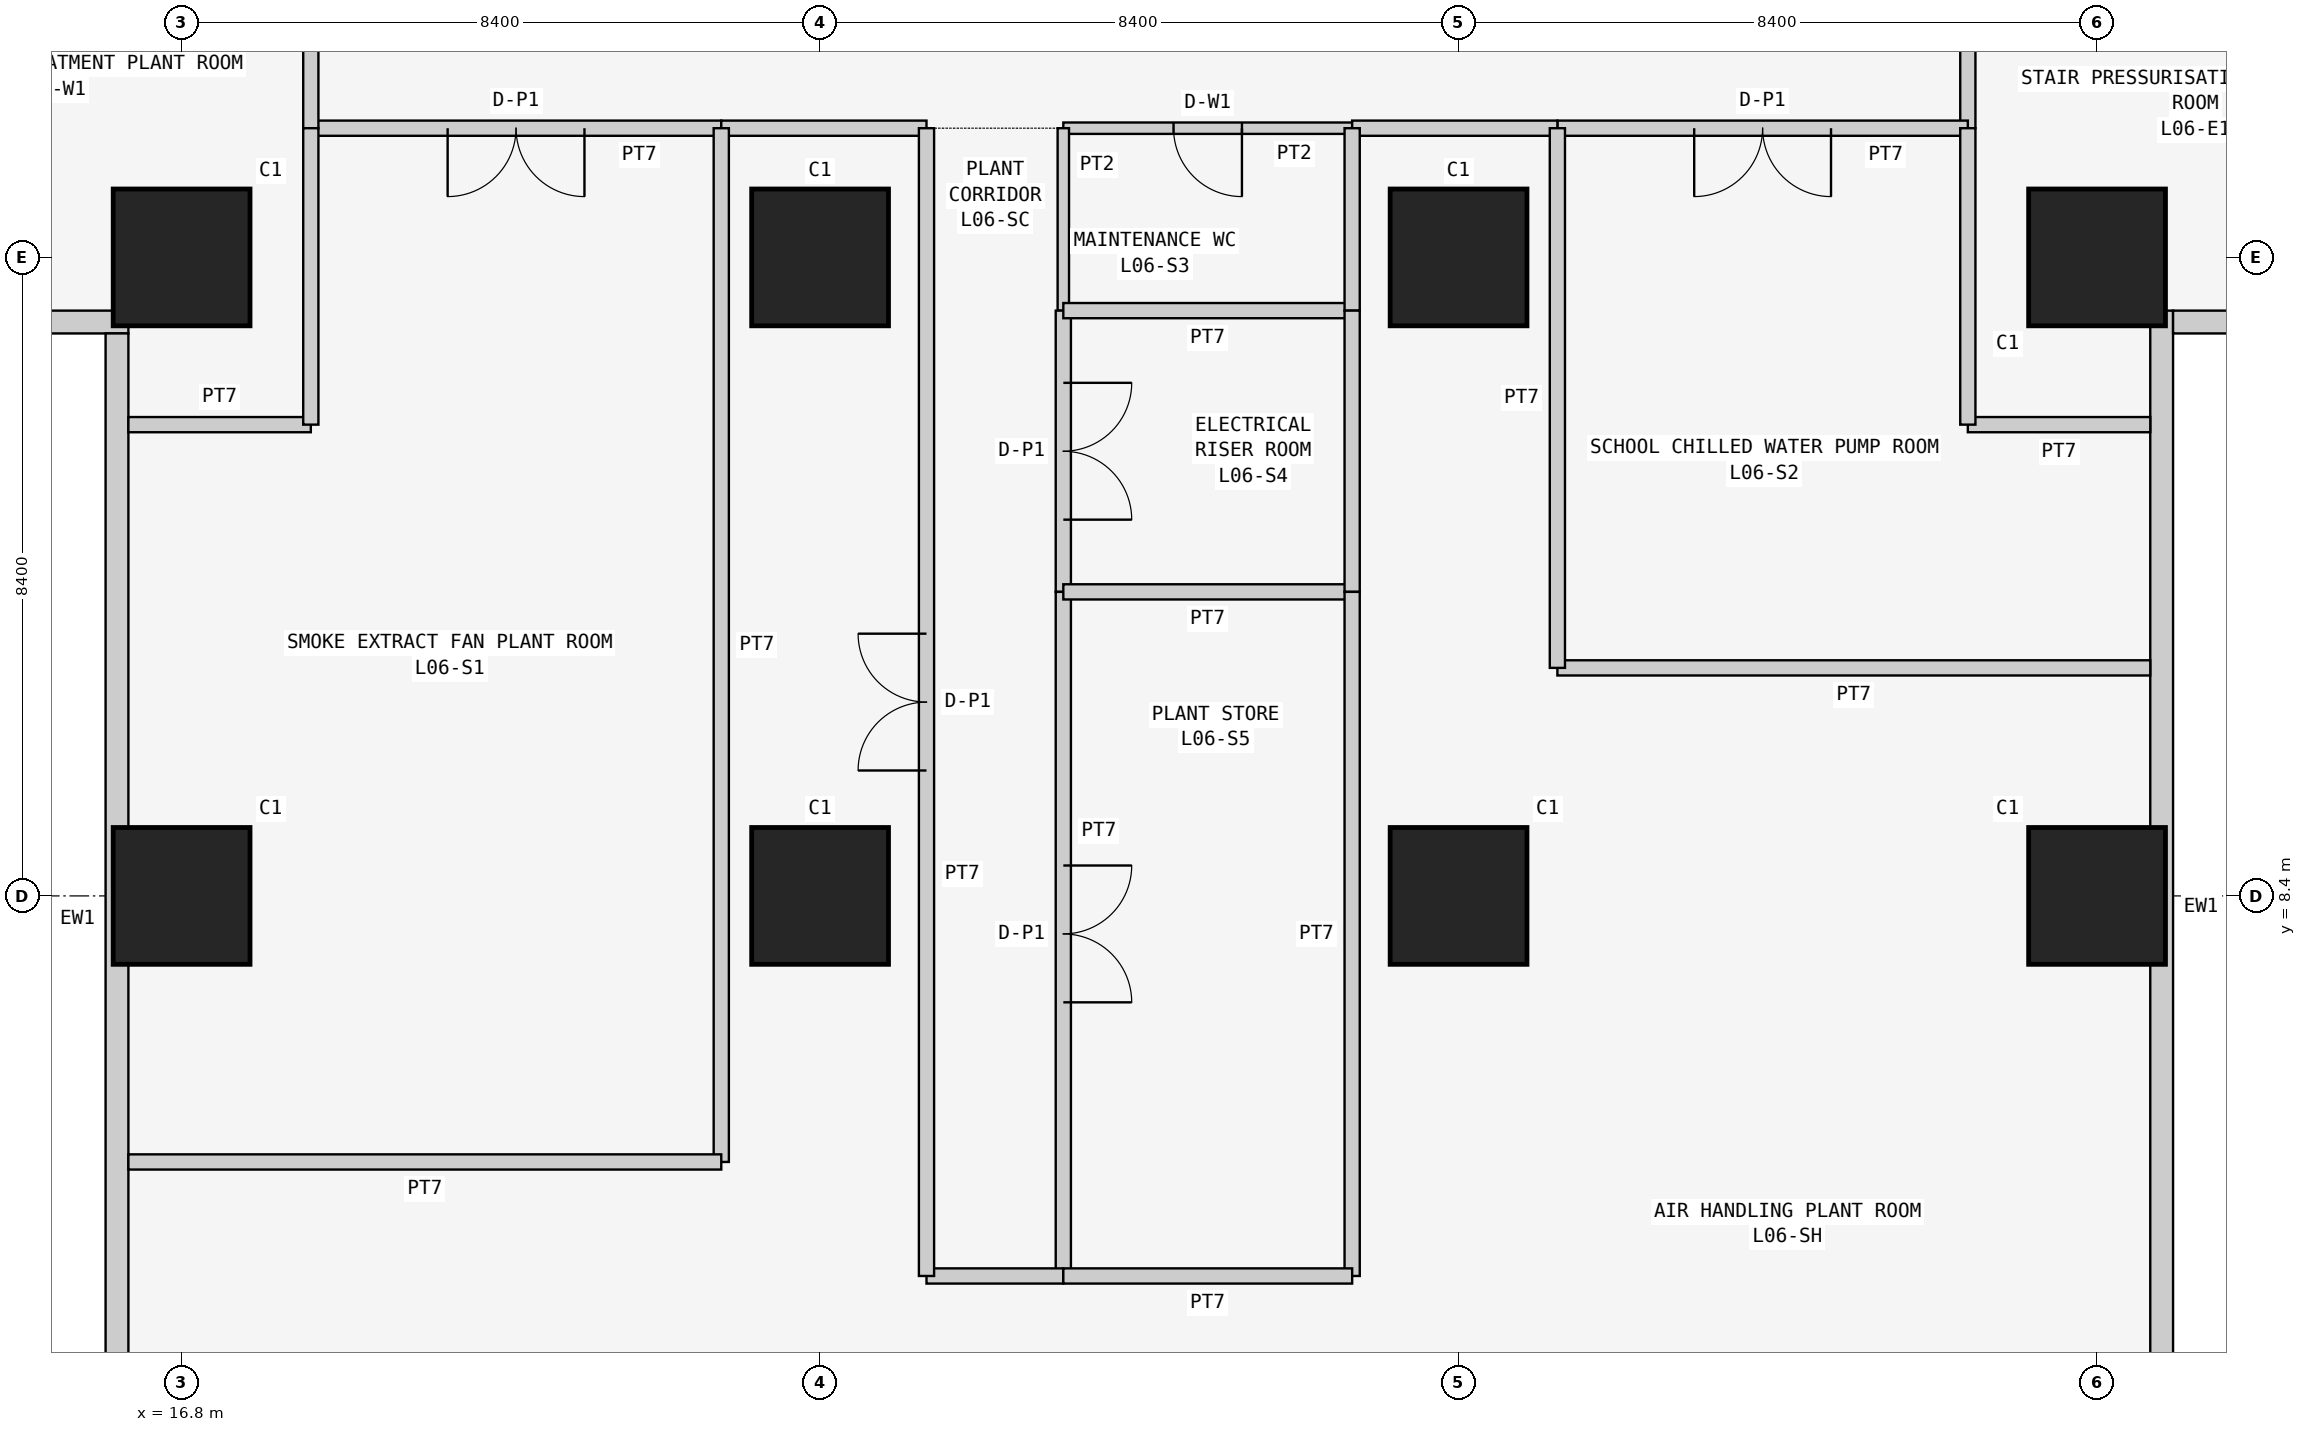
"""IFC4 building model, lengths in metres.
Left out: names, types, materials, properties, quantities, classifications, styles, units other than length and angle.
Written with IfcOpenShell. Run it as: python <this file> out.ifc"""

import sys

from ifc_helpers import new_model, si_unit, direction, frame, frame_2d, origin, origin_2d, place, context, subcontext, project, spatial, rectangle, extrude, element, fill, save


model = new_model("IFC4")
c1 = context("Model", 3, precision=1e-05, world=origin(), true_north=direction((0.0, 1.0)))
c2 = subcontext(c1, "Body", "Model", "MODEL_VIEW")
j1 = project(units=[si_unit("LENGTHUNIT", "METRE"), si_unit("PLANEANGLEUNIT", "RADIAN")], contexts=[c1])
p1 = place(None, origin())
s1 = spatial("IfcSite", under=j1, at=p1, CompositionType="ELEMENT")
p2 = place(p1, origin())
s2 = spatial("IfcBuilding", under=s1, at=p2, CompositionType="ELEMENT")
p3 = place(p2, frame((0.0, 0.0, 28.5)))
s3 = spatial("IfcBuildingStorey", under=s2, at=p3, CompositionType="ELEMENT", Elevation=28.5)
for number, where, z_axis, x_axis in (
    (1, (16.8, 8.4, 0.0), (0.0, 0.0, 1.0), (1.0, 0.0, 0.0)),
    (2, (16.8, 16.8, 0.0), (0.0, 0.0, 1.0), (1.0, 0.0, 0.0)),
    (3, (25.2, 8.4, 0.0), (0.0, 0.0, 1.0), (1.0, 0.0, 0.0)),
    (4, (25.2, 16.8, 0.0), (0.0, 0.0, 1.0), (1.0, 0.0, 0.0)),
    (5, (33.6, 8.4, 0.0), (0.0, 0.0, 1.0), (1.0, 0.0, 0.0)),
    (6, (33.6, 16.8, 0.0), (0.0, 0.0, 1.0), (1.0, 0.0, 0.0)),
    (7, (42.0, 8.4, 0.0), (0.0, 0.0, 1.0), (1.0, 0.0, 0.0)),
    (8, (42.0, 16.8, 0.0), (0.0, 0.0, 1.0), (1.0, 0.0, 0.0)),
):
    element("IfcColumn", number, at=place(p3, frame(where, z_axis=z_axis, x_axis=x_axis)), inside=s3, PredefinedType="COLUMN", context=c2, shape_type="SweptSolid", body=[
        extrude(rectangle(XDim=1.8, YDim=1.8, at=origin_2d()), origin(), (0.0, 0.0, 1.0), 6.0),
    ])
p4 = place(p3, frame((0.4, 15.95, 0.0), z_axis=(0.0, 0.0, 1.0), x_axis=(1.0, 0.0, 0.0)))
e9 = element("IfcWall", 9, at=p4, inside=s3, PredefinedType="SOLIDWALL", context=c2, shape_type="SweptSolid", body=[
    extrude(rectangle(XDim=15.7, YDim=0.3, at=frame_2d((7.85, 0.0))), origin(), (0.0, 0.0, 1.0), 5.85),
])
p5 = place(p3, frame((15.95, 15.8, 0.0), z_axis=(0.0, 0.0, 1.0), x_axis=(0.0, -1.0, 0.0)))
e10 = element("IfcWall", 10, at=p5, inside=s3, PredefinedType="SOLIDWALL", context=c2, shape_type="SweptSolid", body=[
    extrude(rectangle(XDim=15.4, YDim=0.3, at=frame_2d((7.7, 0.0))), origin(), (0.0, 0.0, 1.0), 5.85),
])
p6 = place(p3, frame((42.85, 0.4, 0.0), z_axis=(0.0, 0.0, 1.0), x_axis=(0.0, 1.0, 0.0)))
e11 = element("IfcWall", 11, at=p6, inside=s3, PredefinedType="SOLIDWALL", context=c2, shape_type="SweptSolid", body=[
    extrude(rectangle(XDim=15.7, YDim=0.3, at=frame_2d((7.85, 0.0))), origin(), (0.0, 0.0, 1.0), 5.85),
])
p7 = place(p3, frame((43.0, 15.95, 0.0), z_axis=(0.0, 0.0, 1.0), x_axis=(1.0, 0.0, 0.0)))
e12 = element("IfcWall", 12, at=p7, inside=s3, PredefinedType="SOLIDWALL", context=c2, shape_type="SweptSolid", body=[
    extrude(rectangle(XDim=15.4, YDim=0.3, at=frame_2d((7.7, 0.0))), origin(), (0.0, 0.0, 1.0), 5.85),
])
p8 = place(p3, frame((40.3, 23.9, 0.0), z_axis=(0.0, 0.0, 1.0), x_axis=(0.0, -1.0, 0.0)))
e13 = element("IfcWall", 13, at=p8, inside=s3, PredefinedType="PARTITIONING", context=c2, shape_type="SweptSolid", body=[
    extrude(rectangle(XDim=5.4, YDim=0.2, at=frame_2d((2.7, 0.0))), origin(), (0.0, 0.0, 1.0), 5.85),
])
p9 = place(p8, frame((1.8, 0.0, 0.0)))
e14 = element("IfcOpeningElement", 14, at=p9, cuts=e13, PredefinedType="OPENING", context=c2, shape_type="SweptSolid", body=[
    extrude(rectangle(XDim=1.8, YDim=2.4, at=frame_2d((0.9, 1.2))), frame((0.0, 0.11, 0.0), z_axis=(0.0, -1.0, 0.0), x_axis=(1.0, 0.0, 0.0)), (0.0, 0.0, 1.0), 0.22),
])
p10 = place(p3, frame((23.9, 18.5, 0.0), z_axis=(0.0, 0.0, 1.0), x_axis=(-1.0, 0.0, 0.0)))
e15 = element("IfcWall", 15, at=p10, inside=s3, PredefinedType="PARTITIONING", context=c2, shape_type="SweptSolid", body=[
    extrude(rectangle(XDim=5.4, YDim=0.2, at=frame_2d((2.7, 0.0))), origin(), (0.0, 0.0, 1.0), 5.85),
])
p11 = place(p10, frame((1.8, 0.0, 0.0)))
e16 = element("IfcOpeningElement", 16, at=p11, cuts=e15, PredefinedType="OPENING", context=c2, shape_type="SweptSolid", body=[
    extrude(rectangle(XDim=1.8, YDim=2.4, at=frame_2d((0.9, 1.2))), frame((0.0, 0.11, 0.0), z_axis=(0.0, -1.0, 0.0), x_axis=(1.0, 0.0, 0.0)), (0.0, 0.0, 1.0), 0.22),
])
p12 = place(p3, frame((40.3, 18.5, 0.0), z_axis=(0.0, 0.0, 1.0), x_axis=(-1.0, 0.0, 0.0)))
e17 = element("IfcWall", 17, at=p12, inside=s3, PredefinedType="PARTITIONING", context=c2, shape_type="SweptSolid", body=[
    extrude(rectangle(XDim=5.4, YDim=0.2, at=frame_2d((2.7, 0.0))), origin(), (0.0, 0.0, 1.0), 5.85),
])
p13 = place(p12, frame((1.8, 0.0, 0.0)))
e18 = element("IfcOpeningElement", 18, at=p13, cuts=e17, PredefinedType="OPENING", context=c2, shape_type="SweptSolid", body=[
    extrude(rectangle(XDim=1.8, YDim=2.4, at=frame_2d((0.9, 1.2))), frame((0.0, 0.11, 0.0), z_axis=(0.0, -1.0, 0.0), x_axis=(1.0, 0.0, 0.0)), (0.0, 0.0, 1.0), 0.22),
])
p14 = place(p3, frame((32.2, 18.5, 0.0), z_axis=(0.0, 0.0, 1.0), x_axis=(-1.0, 0.0, 0.0)))
e19 = element("IfcWall", 19, at=p14, inside=s3, PredefinedType="PARTITIONING", context=c2, shape_type="SweptSolid", body=[
    extrude(rectangle(XDim=3.8, YDim=0.15, at=frame_2d((1.9, 0.0))), origin(), (0.0, 0.0, 1.0), 5.85),
])
p15 = place(p14, frame((1.45, 0.0, 0.0)))
e20 = element("IfcOpeningElement", 20, at=p15, cuts=e19, PredefinedType="OPENING", context=c2, shape_type="SweptSolid", body=[
    extrude(rectangle(XDim=0.9, YDim=2.1, at=frame_2d((0.45, 1.05))), frame((0.0, 0.085, 0.0), z_axis=(0.0, -1.0, 0.0), x_axis=(1.0, 0.0, 0.0)), (0.0, 0.0, 1.0), 0.17),
])
p16 = place(p3, frame((26.6, 18.5, 0.0), z_axis=(0.0, 0.0, 1.0), x_axis=(-1.0, 0.0, 0.0)))
e21 = element("IfcWall", 21, at=p16, inside=s3, PredefinedType="PARTITIONING", context=c2, shape_type="SweptSolid", body=[
    extrude(rectangle(XDim=2.7, YDim=0.2, at=frame_2d((1.35, 0.0))), origin(), (0.0, 0.0, 1.0), 5.85),
])
p17 = place(p3, frame((34.9, 18.5, 0.0), z_axis=(0.0, 0.0, 1.0), x_axis=(-1.0, 0.0, 0.0)))
e22 = element("IfcWall", 22, at=p17, inside=s3, PredefinedType="PARTITIONING", context=c2, shape_type="SweptSolid", body=[
    extrude(rectangle(XDim=2.7, YDim=0.2, at=frame_2d((1.35, 0.0))), origin(), (0.0, 0.0, 1.0), 5.85),
])
p18 = place(p3, frame((18.5, 18.5, 0.0), z_axis=(0.0, 0.0, 1.0), x_axis=(0.0, 1.0, 0.0)))
e23 = element("IfcWall", 23, at=p18, inside=s3, PredefinedType="PARTITIONING", context=c2, shape_type="SweptSolid", body=[
    extrude(rectangle(XDim=5.4, YDim=0.2, at=frame_2d((2.7, 0.0))), origin(), (0.0, 0.0, 1.0), 5.85),
])
p19 = place(p18, frame((1.8, 0.0, 0.0)))
e24 = element("IfcOpeningElement", 24, at=p19, cuts=e23, PredefinedType="OPENING", context=c2, shape_type="SweptSolid", body=[
    extrude(rectangle(XDim=1.8, YDim=2.4, at=frame_2d((0.9, 1.2))), frame((0.0, 0.11, 0.0), z_axis=(0.0, -1.0, 0.0), x_axis=(1.0, 0.0, 0.0)), (0.0, 0.0, 1.0), 0.22),
])
p20 = place(p3, frame((42.7, 14.6, 0.0), z_axis=(0.0, 0.0, 1.0), x_axis=(-1.0, 0.0, 0.0)))
e25 = element("IfcWall", 25, at=p20, inside=s3, PredefinedType="PARTITIONING", context=c2, shape_type="SweptSolid", body=[
    extrude(rectangle(XDim=2.4, YDim=0.2, at=frame_2d((1.2, 0.0))), origin(), (0.0, 0.0, 1.0), 5.85),
])
p21 = place(p3, frame((40.3, 14.6, 0.0), z_axis=(0.0, 0.0, 1.0), x_axis=(0.0, 1.0, 0.0)))
e26 = element("IfcWall", 26, at=p21, inside=s3, PredefinedType="PARTITIONING", context=c2, shape_type="SweptSolid", body=[
    extrude(rectangle(XDim=3.9, YDim=0.2, at=frame_2d((1.95, 0.0))), origin(), (0.0, 0.0, 1.0), 5.85),
])
p22 = place(p3, frame((23.9, 18.5, 0.0), z_axis=(0.0, 0.0, 1.0), x_axis=(0.0, -1.0, 0.0)))
e27 = element("IfcWall", 27, at=p22, inside=s3, PredefinedType="PARTITIONING", context=c2, shape_type="SweptSolid", body=[
    extrude(rectangle(XDim=13.6, YDim=0.2, at=frame_2d((6.8, 0.0))), origin(), (0.0, 0.0, 1.0), 5.85),
])
p23 = place(p3, frame((23.9, 4.9, 0.0), z_axis=(0.0, 0.0, 1.0), x_axis=(-1.0, 0.0, 0.0)))
e28 = element("IfcWall", 28, at=p23, inside=s3, PredefinedType="PARTITIONING", context=c2, shape_type="SweptSolid", body=[
    extrude(rectangle(XDim=7.8, YDim=0.2, at=frame_2d((3.9, 0.0))), origin(), (0.0, 0.0, 1.0), 5.85),
])
p24 = place(p3, frame((16.1, 14.6, 0.0), z_axis=(0.0, 0.0, 1.0), x_axis=(1.0, 0.0, 0.0)))
e29 = element("IfcWall", 29, at=p24, inside=s3, PredefinedType="PARTITIONING", context=c2, shape_type="SweptSolid", body=[
    extrude(rectangle(XDim=2.4, YDim=0.2, at=frame_2d((1.2, 0.0))), origin(), (0.0, 0.0, 1.0), 5.85),
])
p25 = place(p3, frame((18.5, 14.6, 0.0), z_axis=(0.0, 0.0, 1.0), x_axis=(0.0, 1.0, 0.0)))
e30 = element("IfcWall", 30, at=p25, inside=s3, PredefinedType="PARTITIONING", context=c2, shape_type="SweptSolid", body=[
    extrude(rectangle(XDim=3.9, YDim=0.2, at=frame_2d((1.95, 0.0))), origin(), (0.0, 0.0, 1.0), 5.85),
])
p26 = place(p3, frame((42.7, 11.4, 0.0), z_axis=(0.0, 0.0, 1.0), x_axis=(-1.0, 0.0, 0.0)))
e31 = element("IfcWall", 31, at=p26, inside=s3, PredefinedType="PARTITIONING", context=c2, shape_type="SweptSolid", body=[
    extrude(rectangle(XDim=7.8, YDim=0.2, at=frame_2d((3.9, 0.0))), origin(), (0.0, 0.0, 1.0), 5.85),
])
p27 = place(p3, frame((34.9, 11.4, 0.0), z_axis=(0.0, 0.0, 1.0), x_axis=(0.0, 1.0, 0.0)))
e32 = element("IfcWall", 32, at=p27, inside=s3, PredefinedType="PARTITIONING", context=c2, shape_type="SweptSolid", body=[
    extrude(rectangle(XDim=7.1, YDim=0.2, at=frame_2d((3.55, 0.0))), origin(), (0.0, 0.0, 1.0), 5.85),
])
p28 = place(p3, frame((28.4, 18.5, 0.0), z_axis=(0.0, 0.0, 1.0), x_axis=(0.0, -1.0, 0.0)))
e33 = element("IfcWall", 33, at=p28, inside=s3, PredefinedType="PARTITIONING", context=c2, shape_type="SweptSolid", body=[
    extrude(rectangle(XDim=2.4, YDim=0.15, at=frame_2d((1.2, 0.0))), origin(), (0.0, 0.0, 1.0), 5.85),
])
p29 = place(p3, frame((28.4, 16.1, 0.0), z_axis=(0.0, 0.0, 1.0), x_axis=(0.0, -1.0, 0.0)))
e34 = element("IfcWall", 34, at=p29, inside=s3, PredefinedType="PARTITIONING", context=c2, shape_type="SweptSolid", body=[
    extrude(rectangle(XDim=3.7, YDim=0.2, at=frame_2d((1.85, 0.0))), origin(), (0.0, 0.0, 1.0), 5.85),
])
p30 = place(p29, frame((0.95, 0.0, 0.0)))
e35 = element("IfcOpeningElement", 35, at=p30, cuts=e34, PredefinedType="OPENING", context=c2, shape_type="SweptSolid", body=[
    extrude(rectangle(XDim=1.8, YDim=2.4, at=frame_2d((0.9, 1.2))), frame((0.0, 0.11, 0.0), z_axis=(0.0, -1.0, 0.0), x_axis=(1.0, 0.0, 0.0)), (0.0, 0.0, 1.0), 0.22),
])
p31 = place(p3, frame((28.4, 12.4, 0.0), z_axis=(0.0, 0.0, 1.0), x_axis=(0.0, -1.0, 0.0)))
e36 = element("IfcWall", 36, at=p31, inside=s3, PredefinedType="PARTITIONING", context=c2, shape_type="SweptSolid", body=[
    extrude(rectangle(XDim=9.0, YDim=0.2, at=frame_2d((4.5, 0.0))), origin(), (0.0, 0.0, 1.0), 5.85),
])
p32 = place(p31, frame((3.6, 0.0, 0.0)))
e37 = element("IfcOpeningElement", 37, at=p32, cuts=e36, PredefinedType="OPENING", context=c2, shape_type="SweptSolid", body=[
    extrude(rectangle(XDim=1.8, YDim=2.4, at=frame_2d((0.9, 1.2))), frame((0.0, 0.11, 0.0), z_axis=(0.0, -1.0, 0.0), x_axis=(1.0, 0.0, 0.0)), (0.0, 0.0, 1.0), 0.22),
])
p33 = place(p3, frame((28.4, 3.4, 0.0), z_axis=(0.0, 0.0, 1.0), x_axis=(-1.0, 0.0, 0.0)))
e38 = element("IfcWall", 38, at=p33, inside=s3, PredefinedType="PARTITIONING", context=c2, shape_type="SweptSolid", body=[
    extrude(rectangle(XDim=1.8, YDim=0.2, at=frame_2d((0.9, 0.0))), origin(), (0.0, 0.0, 1.0), 5.85),
])
p34 = place(p3, frame((26.6, 3.4, 0.0), z_axis=(0.0, 0.0, 1.0), x_axis=(0.0, 1.0, 0.0)))
e39 = element("IfcWall", 39, at=p34, inside=s3, PredefinedType="PARTITIONING", context=c2, shape_type="SweptSolid", body=[
    extrude(rectangle(XDim=15.1, YDim=0.2, at=frame_2d((7.55, 0.0))), origin(), (0.0, 0.0, 1.0), 5.85),
])
p35 = place(p34, frame((6.65, 0.0, 0.0)))
e40 = element("IfcOpeningElement", 40, at=p35, cuts=e39, PredefinedType="OPENING", context=c2, shape_type="SweptSolid", body=[
    extrude(rectangle(XDim=1.8, YDim=2.4, at=frame_2d((0.9, 1.2))), frame((0.0, 0.11, 0.0), z_axis=(0.0, -1.0, 0.0), x_axis=(1.0, 0.0, 0.0)), (0.0, 0.0, 1.0), 0.22),
])
p36 = place(p3, frame((32.2, 16.1, 0.0), z_axis=(0.0, 0.0, 1.0), x_axis=(-1.0, 0.0, 0.0)))
e41 = element("IfcWall", 41, at=p36, inside=s3, PredefinedType="PARTITIONING", context=c2, shape_type="SweptSolid", body=[
    extrude(rectangle(XDim=3.8, YDim=0.2, at=frame_2d((1.9, 0.0))), origin(), (0.0, 0.0, 1.0), 5.85),
])
p37 = place(p3, frame((32.2, 18.5, 0.0), z_axis=(0.0, 0.0, 1.0), x_axis=(0.0, -1.0, 0.0)))
e42 = element("IfcWall", 42, at=p37, inside=s3, PredefinedType="PARTITIONING", context=c2, shape_type="SweptSolid", body=[
    extrude(rectangle(XDim=2.4, YDim=0.2, at=frame_2d((1.2, 0.0))), origin(), (0.0, 0.0, 1.0), 5.85),
])
p38 = place(p3, frame((32.2, 12.4, 0.0), z_axis=(0.0, 0.0, 1.0), x_axis=(-1.0, 0.0, 0.0)))
e43 = element("IfcWall", 43, at=p38, inside=s3, PredefinedType="PARTITIONING", context=c2, shape_type="SweptSolid", body=[
    extrude(rectangle(XDim=3.8, YDim=0.2, at=frame_2d((1.9, 0.0))), origin(), (0.0, 0.0, 1.0), 5.85),
])
p39 = place(p3, frame((32.2, 16.1, 0.0), z_axis=(0.0, 0.0, 1.0), x_axis=(0.0, -1.0, 0.0)))
e44 = element("IfcWall", 44, at=p39, inside=s3, PredefinedType="PARTITIONING", context=c2, shape_type="SweptSolid", body=[
    extrude(rectangle(XDim=3.7, YDim=0.2, at=frame_2d((1.85, 0.0))), origin(), (0.0, 0.0, 1.0), 5.85),
])
p40 = place(p3, frame((32.2, 12.4, 0.0), z_axis=(0.0, 0.0, 1.0), x_axis=(0.0, -1.0, 0.0)))
e45 = element("IfcWall", 45, at=p40, inside=s3, PredefinedType="PARTITIONING", context=c2, shape_type="SweptSolid", body=[
    extrude(rectangle(XDim=9.0, YDim=0.2, at=frame_2d((4.5, 0.0))), origin(), (0.0, 0.0, 1.0), 5.85),
])
p41 = place(p3, frame((32.2, 3.4, 0.0), z_axis=(0.0, 0.0, 1.0), x_axis=(-1.0, 0.0, 0.0)))
e46 = element("IfcWall", 46, at=p41, inside=s3, PredefinedType="PARTITIONING", context=c2, shape_type="SweptSolid", body=[
    extrude(rectangle(XDim=3.8, YDim=0.2, at=frame_2d((1.9, 0.0))), origin(), (0.0, 0.0, 1.0), 5.85),
])
p42 = place(p11, origin())
e47 = element("IfcDoor", 47, at=p42, inside=s3, OperationType="DOUBLE_DOOR_SINGLE_SWING", PredefinedType="DOOR", context=c2, shape_type="SweptSolid", body=[
    extrude(rectangle(XDim=1.8, YDim=2.4, at=frame_2d((0.9, 1.2))), frame((0.0, 0.025, 0.0), z_axis=(0.0, -1.0, 0.0), x_axis=(1.0, 0.0, 0.0)), (0.0, 0.0, 1.0), 0.05),
])
fill(e16, e47)
p43 = place(p13, origin())
e48 = element("IfcDoor", 48, at=p43, inside=s3, OperationType="DOUBLE_DOOR_SINGLE_SWING", PredefinedType="DOOR", context=c2, shape_type="SweptSolid", body=[
    extrude(rectangle(XDim=1.8, YDim=2.4, at=frame_2d((0.9, 1.2))), frame((0.0, 0.025, 0.0), z_axis=(0.0, -1.0, 0.0), x_axis=(1.0, 0.0, 0.0)), (0.0, 0.0, 1.0), 0.05),
])
fill(e18, e48)
p44 = place(p15, origin())
e49 = element("IfcDoor", 49, at=p44, inside=s3, OperationType="SINGLE_SWING_LEFT", PredefinedType="DOOR", context=c2, shape_type="SweptSolid", body=[
    extrude(rectangle(XDim=0.9, YDim=2.1, at=frame_2d((0.45, 1.05))), frame((0.0, 0.025, 0.0), z_axis=(0.0, -1.0, 0.0), x_axis=(1.0, 0.0, 0.0)), (0.0, 0.0, 1.0), 0.05),
])
fill(e20, e49)
p45 = place(p30, origin())
e50 = element("IfcDoor", 50, at=p45, inside=s3, OperationType="DOUBLE_DOOR_SINGLE_SWING", PredefinedType="DOOR", context=c2, shape_type="SweptSolid", body=[
    extrude(rectangle(XDim=1.8, YDim=2.4, at=frame_2d((0.9, 1.2))), frame((0.0, 0.025, 0.0), z_axis=(0.0, -1.0, 0.0), x_axis=(1.0, 0.0, 0.0)), (0.0, 0.0, 1.0), 0.05),
])
fill(e35, e50)
p46 = place(p32, origin())
e51 = element("IfcDoor", 51, at=p46, inside=s3, OperationType="DOUBLE_DOOR_SINGLE_SWING", PredefinedType="DOOR", context=c2, shape_type="SweptSolid", body=[
    extrude(rectangle(XDim=1.8, YDim=2.4, at=frame_2d((0.9, 1.2))), frame((0.0, 0.025, 0.0), z_axis=(0.0, -1.0, 0.0), x_axis=(1.0, 0.0, 0.0)), (0.0, 0.0, 1.0), 0.05),
])
fill(e37, e51)
p47 = place(p35, origin())
e52 = element("IfcDoor", 52, at=p47, inside=s3, OperationType="DOUBLE_DOOR_SINGLE_SWING", PredefinedType="DOOR", context=c2, shape_type="SweptSolid", body=[
    extrude(rectangle(XDim=1.8, YDim=2.4, at=frame_2d((0.9, 1.2))), frame((0.0, 0.025, 0.0), z_axis=(0.0, -1.0, 0.0), x_axis=(1.0, 0.0, 0.0)), (0.0, 0.0, 1.0), 0.05),
])
fill(e40, e52)
save(model, sys.argv[1])
